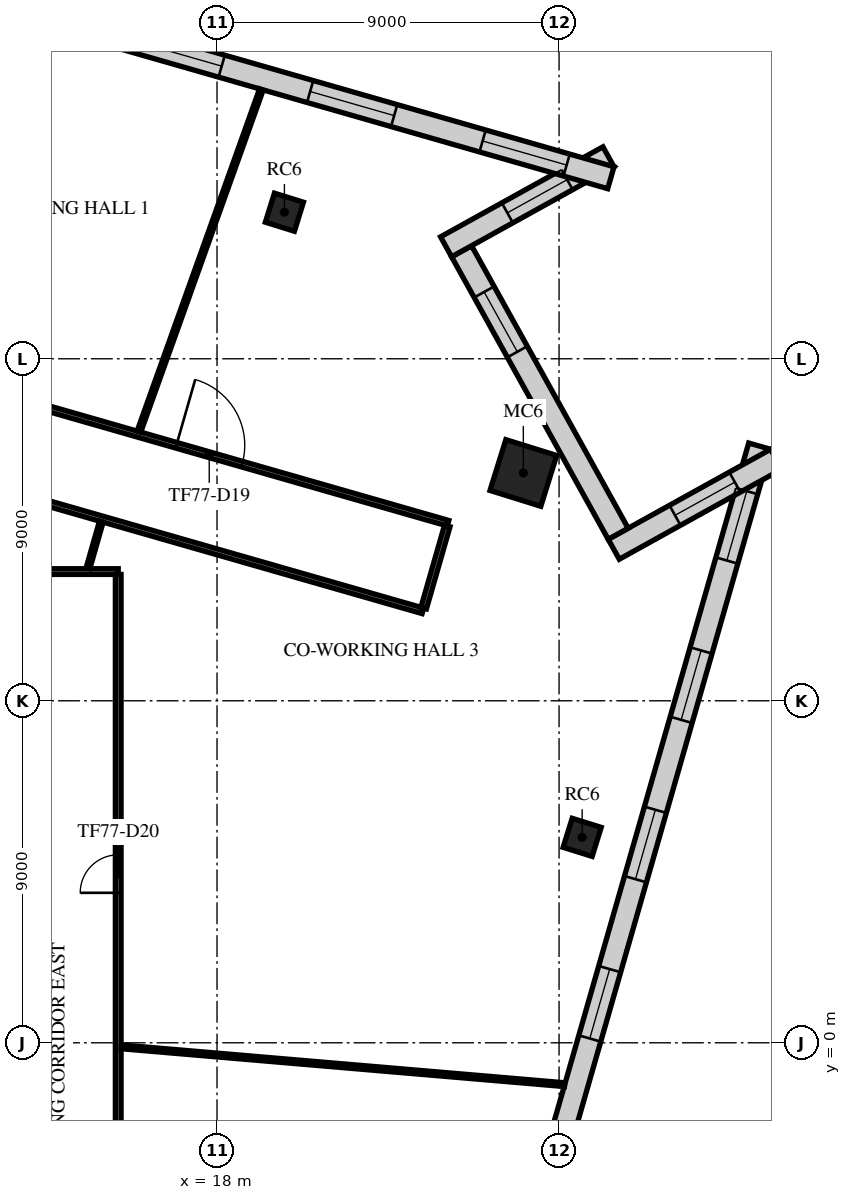
"""IFC4 building model, lengths in metres.
Left out: names, types, materials, properties, quantities, classifications, styles, units other than length and angle.
Written with IfcOpenShell. Run it as: python <this file> out.ifc"""

import sys

from ifc_helpers import new_model, si_unit, direction, frame, frame_2d, origin, origin_2d, place, context, subcontext, project, spatial, rectangle, extrude, element, fill, save


model = new_model("IFC4")
c1 = context("Model", 3, precision=1e-05, world=origin(), true_north=direction((0.0, 1.0)))
c2 = subcontext(c1, "Body", "Model", "MODEL_VIEW")
j1 = project(units=[si_unit("LENGTHUNIT", "METRE"), si_unit("PLANEANGLEUNIT", "RADIAN")], contexts=[c1])
p1 = place(None, origin())
s1 = spatial("IfcSite", under=j1, at=p1, CompositionType="ELEMENT")
p2 = place(p1, origin())
s2 = spatial("IfcBuilding", under=s1, at=p2, CompositionType="ELEMENT")
p3 = place(p2, frame((0.0, 0.0, 324.5)))
s3 = spatial("IfcBuildingStorey", under=s2, at=p3, CompositionType="ELEMENT", Elevation=324.5)
p4 = place(p3, frame((27.608, 5.406, 0.0), z_axis=(0.0, 0.0, 1.0), x_axis=(0.297503182032, 0.954720826567, 0.0)))
e1 = element("IfcColumn", 1, at=p4, inside=s3, PredefinedType="COLUMN", context=c2, shape_type="SweptSolid", body=[
    extrude(rectangle(XDim=0.8, YDim=0.8, at=origin_2d()), origin(), (0.0, 0.0, 1.0), 4.0),
])
p5 = place(p3, frame((26.06, 14.995, 0.0), z_axis=(0.0, 0.0, 1.0), x_axis=(0.297503182032, 0.954720826567, 0.0)))
e2 = element("IfcColumn", 2, at=p5, inside=s3, PredefinedType="COLUMN", context=c2, shape_type="SweptSolid", body=[
    extrude(rectangle(XDim=1.4, YDim=1.4, at=origin_2d()), origin(), (0.0, 0.0, 1.0), 4.0),
])
p6 = place(p3, frame((19.773, 21.857, 0.0), z_axis=(0.0, 0.0, 1.0), x_axis=(0.297503182032, 0.954720826567, 0.0)))
e3 = element("IfcColumn", 3, at=p6, inside=s3, PredefinedType="COLUMN", context=c2, shape_type="SweptSolid", body=[
    extrude(rectangle(XDim=0.8, YDim=0.8, at=origin_2d()), origin(), (0.0, 0.0, 1.0), 4.0),
])
p7 = place(p3, frame((19.053, -30.42, 0.0), z_axis=(0.0, 0.0, 1.0), x_axis=(0.275637022814, 0.961261791425, 0.0)))
e4 = element("IfcWall", 4, at=p7, inside=s3, PredefinedType="STANDARD", context=c2, shape_type="SweptSolid", body=[
    extrude(rectangle(XDim=47.979, YDim=0.6, at=frame_2d((23.99, 0.0))), origin(), (0.0, 0.0, 1.0), 3.65),
])
p8 = place(p7, frame((1.231, 0.0, 0.9)))
e5 = element("IfcOpeningElement", 5, at=p8, cuts=e4, PredefinedType="OPENING", context=c2, shape_type="SweptSolid", body=[
    extrude(rectangle(XDim=1.9, YDim=2.1, at=frame_2d((0.95, 1.05))), frame((0.0, 0.31, 0.0), z_axis=(0.0, -1.0, 0.0), x_axis=(1.0, 0.0, 0.0)), (0.0, 0.0, 1.0), 0.62),
])
p9 = place(p7, frame((5.593, 0.0, 0.9)))
e6 = element("IfcOpeningElement", 6, at=p9, cuts=e4, PredefinedType="OPENING", context=c2, shape_type="SweptSolid", body=[
    extrude(rectangle(XDim=1.9, YDim=2.1, at=frame_2d((0.95, 1.05))), frame((0.0, 0.31, 0.0), z_axis=(0.0, -1.0, 0.0), x_axis=(1.0, 0.0, 0.0)), (0.0, 0.0, 1.0), 0.62),
])
p10 = place(p7, frame((9.954, 0.0, 0.9)))
e7 = element("IfcOpeningElement", 7, at=p10, cuts=e4, PredefinedType="OPENING", context=c2, shape_type="SweptSolid", body=[
    extrude(rectangle(XDim=1.9, YDim=2.1, at=frame_2d((0.95, 1.05))), frame((0.0, 0.31, 0.0), z_axis=(0.0, -1.0, 0.0), x_axis=(1.0, 0.0, 0.0)), (0.0, 0.0, 1.0), 0.62),
])
p11 = place(p7, frame((14.316, 0.0, 0.9)))
e8 = element("IfcOpeningElement", 8, at=p11, cuts=e4, PredefinedType="OPENING", context=c2, shape_type="SweptSolid", body=[
    extrude(rectangle(XDim=1.9, YDim=2.1, at=frame_2d((0.95, 1.05))), frame((0.0, 0.31, 0.0), z_axis=(0.0, -1.0, 0.0), x_axis=(1.0, 0.0, 0.0)), (0.0, 0.0, 1.0), 0.62),
])
p12 = place(p7, frame((18.678, 0.0, 0.9)))
e9 = element("IfcOpeningElement", 9, at=p12, cuts=e4, PredefinedType="OPENING", context=c2, shape_type="SweptSolid", body=[
    extrude(rectangle(XDim=1.9, YDim=2.1, at=frame_2d((0.95, 1.05))), frame((0.0, 0.31, 0.0), z_axis=(0.0, -1.0, 0.0), x_axis=(1.0, 0.0, 0.0)), (0.0, 0.0, 1.0), 0.62),
])
p13 = place(p7, frame((23.04, 0.0, 0.9)))
e10 = element("IfcOpeningElement", 10, at=p13, cuts=e4, PredefinedType="OPENING", context=c2, shape_type="SweptSolid", body=[
    extrude(rectangle(XDim=1.9, YDim=2.1, at=frame_2d((0.95, 1.05))), frame((0.0, 0.31, 0.0), z_axis=(0.0, -1.0, 0.0), x_axis=(1.0, 0.0, 0.0)), (0.0, 0.0, 1.0), 0.62),
])
p14 = place(p7, frame((27.401, 0.0, 0.9)))
e11 = element("IfcOpeningElement", 11, at=p14, cuts=e4, PredefinedType="OPENING", context=c2, shape_type="SweptSolid", body=[
    extrude(rectangle(XDim=1.9, YDim=2.1, at=frame_2d((0.95, 1.05))), frame((0.0, 0.31, 0.0), z_axis=(0.0, -1.0, 0.0), x_axis=(1.0, 0.0, 0.0)), (0.0, 0.0, 1.0), 0.62),
])
p15 = place(p7, frame((31.763, 0.0, 0.9)))
e12 = element("IfcOpeningElement", 12, at=p15, cuts=e4, PredefinedType="OPENING", context=c2, shape_type="SweptSolid", body=[
    extrude(rectangle(XDim=1.9, YDim=2.1, at=frame_2d((0.95, 1.05))), frame((0.0, 0.31, 0.0), z_axis=(0.0, -1.0, 0.0), x_axis=(1.0, 0.0, 0.0)), (0.0, 0.0, 1.0), 0.62),
])
p16 = place(p7, frame((36.125, 0.0, 0.9)))
e13 = element("IfcOpeningElement", 13, at=p16, cuts=e4, PredefinedType="OPENING", context=c2, shape_type="SweptSolid", body=[
    extrude(rectangle(XDim=1.9, YDim=2.1, at=frame_2d((0.95, 1.05))), frame((0.0, 0.31, 0.0), z_axis=(0.0, -1.0, 0.0), x_axis=(1.0, 0.0, 0.0)), (0.0, 0.0, 1.0), 0.62),
])
p17 = place(p7, frame((40.487, 0.0, 0.9)))
e14 = element("IfcOpeningElement", 14, at=p17, cuts=e4, PredefinedType="OPENING", context=c2, shape_type="SweptSolid", body=[
    extrude(rectangle(XDim=1.9, YDim=2.1, at=frame_2d((0.95, 1.05))), frame((0.0, 0.31, 0.0), z_axis=(0.0, -1.0, 0.0), x_axis=(1.0, 0.0, 0.0)), (0.0, 0.0, 1.0), 0.62),
])
p18 = place(p7, frame((44.848, 0.0, 0.9)))
e15 = element("IfcOpeningElement", 15, at=p18, cuts=e4, PredefinedType="OPENING", context=c2, shape_type="SweptSolid", body=[
    extrude(rectangle(XDim=1.9, YDim=2.1, at=frame_2d((0.95, 1.05))), frame((0.0, 0.31, 0.0), z_axis=(0.0, -1.0, 0.0), x_axis=(1.0, 0.0, 0.0)), (0.0, 0.0, 1.0), 0.62),
])
p19 = place(p3, frame((32.712, 15.356, 0.0), z_axis=(0.0, 0.0, 1.0), x_axis=(-0.874609472896, -0.48482808285, 0.0)))
e16 = element("IfcWall", 16, at=p19, inside=s3, PredefinedType="STANDARD", context=c2, shape_type="SweptSolid", body=[
    extrude(rectangle(XDim=4.885, YDim=0.6, at=frame_2d((2.443, 0.0))), origin(), (0.0, 0.0, 1.0), 3.65),
])
p20 = place(p19, frame((1.243, 0.0, 0.9)))
e17 = element("IfcOpeningElement", 17, at=p20, cuts=e16, PredefinedType="OPENING", context=c2, shape_type="SweptSolid", body=[
    extrude(rectangle(XDim=1.8, YDim=2.1, at=frame_2d((0.9, 1.05))), frame((0.0, 0.31, 0.0), z_axis=(0.0, -1.0, 0.0), x_axis=(1.0, 0.0, 0.0)), (0.0, 0.0, 1.0), 0.62),
])
p21 = place(p3, frame((28.556, 13.395, 0.0), z_axis=(0.0, 0.0, 1.0), x_axis=(-0.48481597855, 0.874616182644, 0.0)))
e18 = element("IfcWall", 18, at=p21, inside=s3, PredefinedType="STANDARD", context=c2, shape_type="SweptSolid", body=[
    extrude(rectangle(XDim=8.5, YDim=0.6, at=frame_2d((4.25, 0.0))), origin(), (0.0, 0.0, 1.0), 3.65),
])
p22 = place(p21, frame((5.475, 0.0, 0.9)))
e19 = element("IfcOpeningElement", 19, at=p22, cuts=e18, PredefinedType="OPENING", context=c2, shape_type="SweptSolid", body=[
    extrude(rectangle(XDim=1.8, YDim=2.1, at=frame_2d((0.9, 1.05))), frame((0.0, 0.31, 0.0), z_axis=(0.0, -1.0, 0.0), x_axis=(1.0, 0.0, 0.0)), (0.0, 0.0, 1.0), 0.62),
])
p23 = place(p3, frame((24.027, 20.946, 0.0), z_axis=(0.0, 0.0, 1.0), x_axis=(0.874642406439, 0.484768667364, 0.0)))
e20 = element("IfcWall", 20, at=p23, inside=s3, PredefinedType="STANDARD", context=c2, shape_type="SweptSolid", body=[
    extrude(rectangle(XDim=4.886, YDim=0.6, at=frame_2d((2.443, 0.0))), origin(), (0.0, 0.0, 1.0), 3.65),
])
p24 = place(p23, frame((1.843, 0.0, 0.9)))
e21 = element("IfcOpeningElement", 21, at=p24, cuts=e20, PredefinedType="OPENING", context=c2, shape_type="SweptSolid", body=[
    extrude(rectangle(XDim=1.8, YDim=2.1, at=frame_2d((0.9, 1.05))), frame((0.0, 0.31, 0.0), z_axis=(0.0, -1.0, 0.0), x_axis=(1.0, 0.0, 0.0)), (0.0, 0.0, 1.0), 0.62),
])
p25 = place(p3, frame((28.363, 22.764, 0.0), z_axis=(0.0, 0.0, 1.0), x_axis=(-0.961261801459, 0.275636987823, 0.0)))
e22 = element("IfcWall", 22, at=p25, inside=s3, PredefinedType="STANDARD", context=c2, shape_type="SweptSolid", body=[
    extrude(rectangle(XDim=42.49, YDim=0.6, at=frame_2d((21.245, 0.0))), origin(), (0.0, 0.0, 1.0), 3.65),
])
p26 = place(p25, frame((1.21, 0.0, 0.9)))
e23 = element("IfcOpeningElement", 23, at=p26, cuts=e22, PredefinedType="OPENING", context=c2, shape_type="SweptSolid", body=[
    extrude(rectangle(XDim=2.3, YDim=2.1, at=frame_2d((1.15, 1.05))), frame((0.0, 0.31, 0.0), z_axis=(0.0, -1.0, 0.0), x_axis=(1.0, 0.0, 0.0)), (0.0, 0.0, 1.0), 0.62),
])
p27 = place(p25, frame((5.932, 0.0, 0.9)))
e24 = element("IfcOpeningElement", 24, at=p27, cuts=e22, PredefinedType="OPENING", context=c2, shape_type="SweptSolid", body=[
    extrude(rectangle(XDim=2.3, YDim=2.1, at=frame_2d((1.15, 1.05))), frame((0.0, 0.31, 0.0), z_axis=(0.0, -1.0, 0.0), x_axis=(1.0, 0.0, 0.0)), (0.0, 0.0, 1.0), 0.62),
])
p28 = place(p25, frame((10.653, 0.0, 0.9)))
e25 = element("IfcOpeningElement", 25, at=p28, cuts=e22, PredefinedType="OPENING", context=c2, shape_type="SweptSolid", body=[
    extrude(rectangle(XDim=2.3, YDim=2.1, at=frame_2d((1.15, 1.05))), frame((0.0, 0.31, 0.0), z_axis=(0.0, -1.0, 0.0), x_axis=(1.0, 0.0, 0.0)), (0.0, 0.0, 1.0), 0.62),
])
p29 = place(p25, frame((15.374, 0.0, 0.9)))
e26 = element("IfcOpeningElement", 26, at=p29, cuts=e22, PredefinedType="OPENING", context=c2, shape_type="SweptSolid", body=[
    extrude(rectangle(XDim=2.3, YDim=2.1, at=frame_2d((1.15, 1.05))), frame((0.0, 0.31, 0.0), z_axis=(0.0, -1.0, 0.0), x_axis=(1.0, 0.0, 0.0)), (0.0, 0.0, 1.0), 0.62),
])
p30 = place(p25, frame((20.095, 0.0, 0.9)))
e27 = element("IfcOpeningElement", 27, at=p30, cuts=e22, PredefinedType="OPENING", context=c2, shape_type="SweptSolid", body=[
    extrude(rectangle(XDim=2.3, YDim=2.1, at=frame_2d((1.15, 1.05))), frame((0.0, 0.31, 0.0), z_axis=(0.0, -1.0, 0.0), x_axis=(1.0, 0.0, 0.0)), (0.0, 0.0, 1.0), 0.62),
])
p31 = place(p25, frame((24.816, 0.0, 0.9)))
e28 = element("IfcOpeningElement", 28, at=p31, cuts=e22, PredefinedType="OPENING", context=c2, shape_type="SweptSolid", body=[
    extrude(rectangle(XDim=2.3, YDim=2.1, at=frame_2d((1.15, 1.05))), frame((0.0, 0.31, 0.0), z_axis=(0.0, -1.0, 0.0), x_axis=(1.0, 0.0, 0.0)), (0.0, 0.0, 1.0), 0.62),
])
p32 = place(p25, frame((29.537, 0.0, 0.9)))
e29 = element("IfcOpeningElement", 29, at=p32, cuts=e22, PredefinedType="OPENING", context=c2, shape_type="SweptSolid", body=[
    extrude(rectangle(XDim=2.3, YDim=2.1, at=frame_2d((1.15, 1.05))), frame((0.0, 0.31, 0.0), z_axis=(0.0, -1.0, 0.0), x_axis=(1.0, 0.0, 0.0)), (0.0, 0.0, 1.0), 0.62),
])
p33 = place(p25, frame((34.258, 0.0, 0.9)))
e30 = element("IfcOpeningElement", 30, at=p33, cuts=e22, PredefinedType="OPENING", context=c2, shape_type="SweptSolid", body=[
    extrude(rectangle(XDim=2.3, YDim=2.1, at=frame_2d((1.15, 1.05))), frame((0.0, 0.31, 0.0), z_axis=(0.0, -1.0, 0.0), x_axis=(1.0, 0.0, 0.0)), (0.0, 0.0, 1.0), 0.62),
])
p34 = place(p25, frame((38.979, 0.0, 0.9)))
e31 = element("IfcOpeningElement", 31, at=p34, cuts=e22, PredefinedType="OPENING", context=c2, shape_type="SweptSolid", body=[
    extrude(rectangle(XDim=2.3, YDim=2.1, at=frame_2d((1.15, 1.05))), frame((0.0, 0.31, 0.0), z_axis=(0.0, -1.0, 0.0), x_axis=(1.0, 0.0, 0.0)), (0.0, 0.0, 1.0), 0.62),
])
p35 = place(p3, frame((-13.103, 24.334, 0.0), z_axis=(0.0, 0.0, 1.0), x_axis=(0.961265813226, -0.275622996723, 0.0)))
e32 = element("IfcWall", 32, at=p35, inside=s3, PredefinedType="PARTITIONING", context=c2, shape_type="SweptSolid", body=[
    extrude(rectangle(XDim=38.68, YDim=0.15, at=frame_2d((19.34, 0.0))), origin(), (0.0, 0.0, 1.0), 3.25),
])
p36 = place(p35, frame((7.05, 0.0, 0.0)))
e33 = element("IfcOpeningElement", 33, at=p36, cuts=e32, PredefinedType="OPENING", context=c2, shape_type="SweptSolid", body=[
    extrude(rectangle(XDim=1.8, YDim=2.1, at=frame_2d((0.9, 1.05))), frame((0.0, 0.085, 0.0), z_axis=(0.0, -1.0, 0.0), x_axis=(1.0, 0.0, 0.0)), (0.0, 0.0, 1.0), 0.17),
])
p37 = place(p35, frame((19.547, 0.0, 0.0)))
e34 = element("IfcOpeningElement", 34, at=p37, cuts=e32, PredefinedType="OPENING", context=c2, shape_type="SweptSolid", body=[
    extrude(rectangle(XDim=1.0, YDim=2.1, at=frame_2d((0.5, 1.05))), frame((0.0, 0.085, 0.0), z_axis=(0.0, -1.0, 0.0), x_axis=(1.0, 0.0, 0.0)), (0.0, 0.0, 1.0), 0.17),
])
p38 = place(p35, frame((24.893, 0.0, 0.0)))
e35 = element("IfcOpeningElement", 35, at=p38, cuts=e32, PredefinedType="OPENING", context=c2, shape_type="SweptSolid", body=[
    extrude(rectangle(XDim=1.0, YDim=2.1, at=frame_2d((0.5, 1.05))), frame((0.0, 0.085, 0.0), z_axis=(0.0, -1.0, 0.0), x_axis=(1.0, 0.0, 0.0)), (0.0, 0.0, 1.0), 0.17),
])
p39 = place(p35, frame((31.243, 0.0, 0.0)))
e36 = element("IfcOpeningElement", 36, at=p39, cuts=e32, PredefinedType="OPENING", context=c2, shape_type="SweptSolid", body=[
    extrude(rectangle(XDim=1.8, YDim=2.1, at=frame_2d((0.9, 1.05))), frame((0.0, 0.085, 0.0), z_axis=(0.0, -1.0, 0.0), x_axis=(1.0, 0.0, 0.0)), (0.0, 0.0, 1.0), 0.17),
])
p40 = place(p3, frame((9.179, 15.448, 0.0), z_axis=(0.0, 0.0, 1.0), x_axis=(0.961267886057, -0.275615767392, 0.0)))
e37 = element("IfcWall", 37, at=p40, inside=s3, PredefinedType="PARTITIONING", context=c2, shape_type="SweptSolid", body=[
    extrude(rectangle(XDim=14.812, YDim=0.15, at=frame_2d((7.406, 0.0))), origin(), (0.0, 0.0, 1.0), 3.25),
])
p41 = place(p40, frame((1.05, 0.0, 0.0)))
e38 = element("IfcOpeningElement", 38, at=p41, cuts=e37, PredefinedType="OPENING", context=c2, shape_type="SweptSolid", body=[
    extrude(rectangle(XDim=1.0, YDim=2.1, at=frame_2d((0.5, 1.05))), frame((0.0, 0.085, 0.0), z_axis=(0.0, -1.0, 0.0), x_axis=(1.0, 0.0, 0.0)), (0.0, 0.0, 1.0), 0.17),
])
p42 = place(p3, frame((12.4, 12.4, 0.0), z_axis=(0.0, 0.0, 1.0), x_axis=(1.0, 0.0, 0.0)))
e39 = element("IfcWall", 39, at=p42, inside=s3, PredefinedType="PARTITIONING", context=c2, shape_type="SweptSolid", body=[
    extrude(rectangle(XDim=3.0, YDim=0.15, at=frame_2d((1.5, 0.0))), origin(), (0.0, 0.0, 1.0), 3.13),
])
p43 = place(p3, frame((15.4, -15.325, 0.0), z_axis=(0.0, 0.0, 1.0), x_axis=(0.0, 1.0, 0.0)))
e40 = element("IfcWall", 40, at=p43, inside=s3, PredefinedType="PARTITIONING", context=c2, shape_type="SweptSolid", body=[
    extrude(rectangle(XDim=27.65, YDim=0.15, at=frame_2d((13.825, 0.0))), origin(), (0.0, 0.0, 1.0), 3.25),
])
p44 = place(p43, frame((2.05, 0.0, 0.0)))
e41 = element("IfcOpeningElement", 41, at=p44, cuts=e40, PredefinedType="OPENING", context=c2, shape_type="SweptSolid", body=[
    extrude(rectangle(XDim=1.0, YDim=2.1, at=frame_2d((0.5, 1.05))), frame((0.0, 0.085, 0.0), z_axis=(0.0, -1.0, 0.0), x_axis=(1.0, 0.0, 0.0)), (0.0, 0.0, 1.0), 0.17),
])
p45 = place(p43, frame((9.474, 0.0, 0.0)))
e42 = element("IfcOpeningElement", 42, at=p45, cuts=e40, PredefinedType="OPENING", context=c2, shape_type="SweptSolid", body=[
    extrude(rectangle(XDim=1.0, YDim=2.1, at=frame_2d((0.5, 1.05))), frame((0.0, 0.085, 0.0), z_axis=(0.0, -1.0, 0.0), x_axis=(1.0, 0.0, 0.0)), (0.0, 0.0, 1.0), 0.17),
])
p46 = place(p43, frame((19.271, 0.0, 0.0)))
e43 = element("IfcOpeningElement", 43, at=p46, cuts=e40, PredefinedType="OPENING", context=c2, shape_type="SweptSolid", body=[
    extrude(rectangle(XDim=1.0, YDim=2.1, at=frame_2d((0.5, 1.05))), frame((0.0, 0.085, 0.0), z_axis=(0.0, -1.0, 0.0), x_axis=(1.0, 0.0, 0.0)), (0.0, 0.0, 1.0), 0.17),
])
p47 = place(p3, frame((23.438, 11.438, 0.0), z_axis=(0.0, 0.0, 1.0), x_axis=(0.275810058081, 0.96121215757, 0.0)))
e44 = element("IfcWall", 44, at=p47, inside=s3, PredefinedType="PARTITIONING", context=c2, shape_type="SweptSolid", body=[
    extrude(rectangle(XDim=2.25, YDim=0.15, at=frame_2d((1.125, 0.0))), origin(), (0.0, 0.0, 1.0), 3.65),
])
p48 = place(p3, frame((14.604, 12.489, 0.0), z_axis=(0.0, 0.0, 1.0), x_axis=(0.275303052491, 0.96135749297, 0.0)))
e45 = element("IfcWall", 45, at=p48, inside=s3, PredefinedType="PARTITIONING", context=c2, shape_type="SweptSolid", body=[
    extrude(rectangle(XDim=1.274, YDim=0.1, at=frame_2d((0.637, 0.0))), origin(), (0.0, 0.0, 1.0), 3.25),
])
p49 = place(p3, frame((15.479, -0.107, 0.0), z_axis=(0.0, 0.0, 1.0), x_axis=(0.996382096483, -0.084986574283, 0.0)))
e46 = element("IfcWall", 46, at=p49, inside=s3, PredefinedType="PARTITIONING", context=c2, shape_type="SweptSolid", body=[
    extrude(rectangle(XDim=11.709, YDim=0.1, at=frame_2d((5.854, 0.0))), origin(), (0.0, 0.0, 1.0), 3.05),
])
p50 = place(p3, frame((15.946, 16.086, 0.0), z_axis=(0.0, 0.0, 1.0), x_axis=(0.336868591799, 0.941551672432, 0.0)))
e47 = element("IfcWall", 47, at=p50, inside=s3, PredefinedType="PARTITIONING", context=c2, shape_type="SweptSolid", body=[
    extrude(rectangle(XDim=9.56, YDim=0.1, at=frame_2d((4.78, 0.0))), origin(), (0.0, 0.0, 1.0), 3.05),
])
p51 = place(p15, origin())
e48 = element("IfcWindow", 48, at=p51, inside=s3, PartitioningType="SINGLE_PANEL", PredefinedType="WINDOW", context=c2, shape_type="SweptSolid", body=[
    extrude(rectangle(XDim=1.9, YDim=2.1, at=frame_2d((0.95, 1.05))), frame((0.0, 0.03, 0.0), z_axis=(0.0, -1.0, 0.0), x_axis=(1.0, 0.0, 0.0)), (0.0, 0.0, 1.0), 0.06),
])
fill(e12, e48)
p52 = place(p16, origin())
e49 = element("IfcWindow", 49, at=p52, inside=s3, PartitioningType="SINGLE_PANEL", PredefinedType="WINDOW", context=c2, shape_type="SweptSolid", body=[
    extrude(rectangle(XDim=1.9, YDim=2.1, at=frame_2d((0.95, 1.05))), frame((0.0, 0.03, 0.0), z_axis=(0.0, -1.0, 0.0), x_axis=(1.0, 0.0, 0.0)), (0.0, 0.0, 1.0), 0.06),
])
fill(e13, e49)
p53 = place(p17, origin())
e50 = element("IfcWindow", 50, at=p53, inside=s3, PartitioningType="SINGLE_PANEL", PredefinedType="WINDOW", context=c2, shape_type="SweptSolid", body=[
    extrude(rectangle(XDim=1.9, YDim=2.1, at=frame_2d((0.95, 1.05))), frame((0.0, 0.03, 0.0), z_axis=(0.0, -1.0, 0.0), x_axis=(1.0, 0.0, 0.0)), (0.0, 0.0, 1.0), 0.06),
])
fill(e14, e50)
p54 = place(p18, origin())
e51 = element("IfcWindow", 51, at=p54, inside=s3, PartitioningType="SINGLE_PANEL", PredefinedType="WINDOW", context=c2, shape_type="SweptSolid", body=[
    extrude(rectangle(XDim=1.9, YDim=2.1, at=frame_2d((0.95, 1.05))), frame((0.0, 0.03, 0.0), z_axis=(0.0, -1.0, 0.0), x_axis=(1.0, 0.0, 0.0)), (0.0, 0.0, 1.0), 0.06),
])
fill(e15, e51)
p55 = place(p20, origin())
e52 = element("IfcWindow", 52, at=p55, inside=s3, PartitioningType="SINGLE_PANEL", PredefinedType="WINDOW", context=c2, shape_type="SweptSolid", body=[
    extrude(rectangle(XDim=1.8, YDim=2.1, at=frame_2d((0.9, 1.05))), frame((0.0, 0.03, 0.0), z_axis=(0.0, -1.0, 0.0), x_axis=(1.0, 0.0, 0.0)), (0.0, 0.0, 1.0), 0.06),
])
fill(e17, e52)
p56 = place(p22, origin())
e53 = element("IfcWindow", 53, at=p56, inside=s3, PartitioningType="SINGLE_PANEL", PredefinedType="WINDOW", context=c2, shape_type="SweptSolid", body=[
    extrude(rectangle(XDim=1.8, YDim=2.1, at=frame_2d((0.9, 1.05))), frame((0.0, 0.03, 0.0), z_axis=(0.0, -1.0, 0.0), x_axis=(1.0, 0.0, 0.0)), (0.0, 0.0, 1.0), 0.06),
])
fill(e19, e53)
p57 = place(p24, origin())
e54 = element("IfcWindow", 54, at=p57, inside=s3, PartitioningType="SINGLE_PANEL", PredefinedType="WINDOW", context=c2, shape_type="SweptSolid", body=[
    extrude(rectangle(XDim=1.8, YDim=2.1, at=frame_2d((0.9, 1.05))), frame((0.0, 0.03, 0.0), z_axis=(0.0, -1.0, 0.0), x_axis=(1.0, 0.0, 0.0)), (0.0, 0.0, 1.0), 0.06),
])
fill(e21, e54)
p58 = place(p26, origin())
e55 = element("IfcWindow", 55, at=p58, inside=s3, PartitioningType="SINGLE_PANEL", PredefinedType="WINDOW", context=c2, shape_type="SweptSolid", body=[
    extrude(rectangle(XDim=2.3, YDim=2.1, at=frame_2d((1.15, 1.05))), frame((0.0, 0.03, 0.0), z_axis=(0.0, -1.0, 0.0), x_axis=(1.0, 0.0, 0.0)), (0.0, 0.0, 1.0), 0.06),
])
fill(e23, e55)
p59 = place(p27, origin())
e56 = element("IfcWindow", 56, at=p59, inside=s3, PartitioningType="SINGLE_PANEL", PredefinedType="WINDOW", context=c2, shape_type="SweptSolid", body=[
    extrude(rectangle(XDim=2.3, YDim=2.1, at=frame_2d((1.15, 1.05))), frame((0.0, 0.03, 0.0), z_axis=(0.0, -1.0, 0.0), x_axis=(1.0, 0.0, 0.0)), (0.0, 0.0, 1.0), 0.06),
])
fill(e24, e56)
p60 = place(p28, origin())
e57 = element("IfcWindow", 57, at=p60, inside=s3, PartitioningType="SINGLE_PANEL", PredefinedType="WINDOW", context=c2, shape_type="SweptSolid", body=[
    extrude(rectangle(XDim=2.3, YDim=2.1, at=frame_2d((1.15, 1.05))), frame((0.0, 0.03, 0.0), z_axis=(0.0, -1.0, 0.0), x_axis=(1.0, 0.0, 0.0)), (0.0, 0.0, 1.0), 0.06),
])
fill(e25, e57)
p61 = place(p39, origin())
e58 = element("IfcDoor", 58, at=p61, inside=s3, OperationType="DOUBLE_DOOR_SINGLE_SWING", PredefinedType="DOOR", context=c2, shape_type="SweptSolid", body=[
    extrude(rectangle(XDim=1.8, YDim=2.1, at=frame_2d((0.9, 1.05))), frame((0.0, 0.025, 0.0), z_axis=(0.0, -1.0, 0.0), x_axis=(1.0, 0.0, 0.0)), (0.0, 0.0, 1.0), 0.05),
])
fill(e36, e58)
p62 = place(p46, frame((1.0, 0.0, 0.0), z_axis=(0.0, 0.0, 1.0), x_axis=(-1.0, 0.0, 0.0)))
e59 = element("IfcDoor", 59, at=p62, inside=s3, OperationType="SINGLE_SWING_LEFT", PredefinedType="DOOR", context=c2, shape_type="SweptSolid", body=[
    extrude(rectangle(XDim=1.0, YDim=2.1, at=frame_2d((0.5, 1.05))), frame((0.0, 0.025, 0.0), z_axis=(0.0, -1.0, 0.0), x_axis=(1.0, 0.0, 0.0)), (0.0, 0.0, 1.0), 0.05),
])
fill(e43, e59)
save(model, sys.argv[1])
